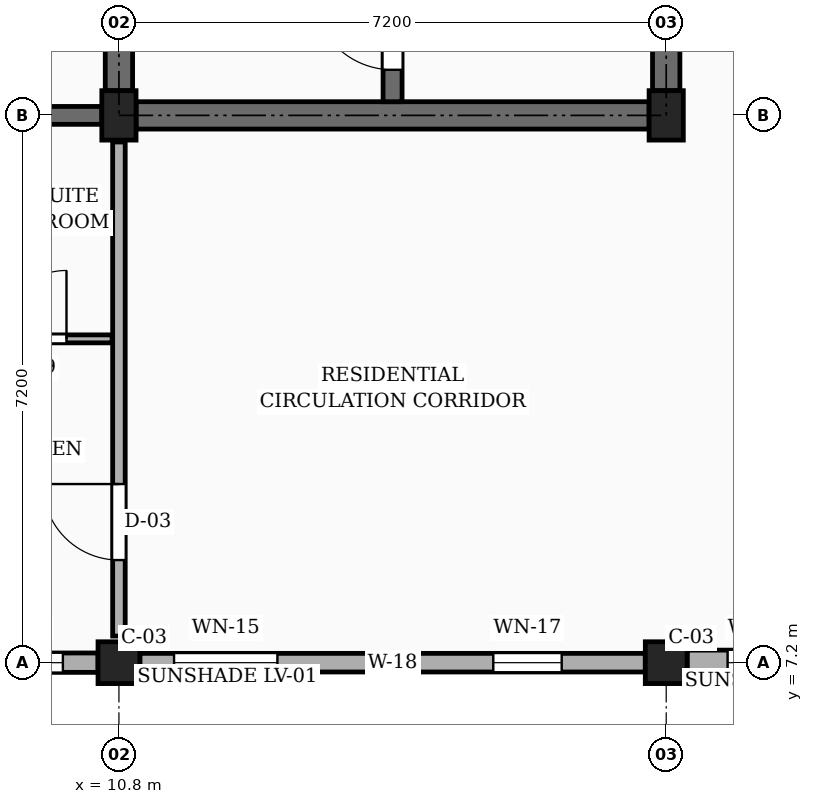
"""IFC4 building model, lengths in metres.
Left out: names, types, materials, properties, quantities, classifications, styles, units other than length and angle.
Written with IfcOpenShell. Run it as: python <this file> out.ifc"""

import sys

from ifc_helpers import new_model, si_unit, direction, frame, frame_2d, origin, origin_2d, place, context, subcontext, project, spatial, rectangle, extrude, element, fill, save


model = new_model("IFC4")
c1 = context("Model", 3, precision=1e-05, world=origin(), true_north=direction((0.0, 1.0)))
c2 = subcontext(c1, "Body", "Model", "MODEL_VIEW")
j1 = project(units=[si_unit("LENGTHUNIT", "METRE"), si_unit("PLANEANGLEUNIT", "RADIAN")], contexts=[c1])
p1 = place(None, origin())
s1 = spatial("IfcSite", under=j1, at=p1, CompositionType="ELEMENT")
p2 = place(p1, origin())
s2 = spatial("IfcBuilding", under=s1, at=p2, CompositionType="ELEMENT")
p3 = place(p2, frame((0.0, 0.0, 17.1)))
s3 = spatial("IfcBuildingStorey", under=s2, at=p3, CompositionType="ELEMENT", Elevation=17.1)
p4 = place(p3, frame((10.8, 7.2, 0.0), z_axis=(0.0, 0.0, 1.0), x_axis=(1.0, 0.0, 0.0)))
e1 = element("IfcColumn", 1, at=p4, inside=s3, PredefinedType="COLUMN", context=c2, shape_type="SweptSolid", body=[
    extrude(rectangle(XDim=0.55, YDim=0.55, at=origin_2d()), origin(), (0.0, 0.0, 1.0), 3.15),
])
p5 = place(p3, frame((10.8, 14.4, 0.0), z_axis=(0.0, 0.0, 1.0), x_axis=(1.0, 0.0, 0.0)))
e2 = element("IfcColumn", 2, at=p5, inside=s3, PredefinedType="COLUMN", context=c2, shape_type="SweptSolid", body=[
    extrude(rectangle(XDim=0.45, YDim=0.65, at=origin_2d()), origin(), (0.0, 0.0, 1.0), 3.15),
])
p6 = place(p3, frame((18.0, 7.2, 0.0), z_axis=(0.0, 0.0, 1.0), x_axis=(1.0, 0.0, 0.0)))
e3 = element("IfcColumn", 3, at=p6, inside=s3, PredefinedType="COLUMN", context=c2, shape_type="SweptSolid", body=[
    extrude(rectangle(XDim=0.55, YDim=0.55, at=origin_2d()), origin(), (0.0, 0.0, 1.0), 3.15),
])
p7 = place(p3, frame((18.0, 14.4, 0.0), z_axis=(0.0, 0.0, 1.0), x_axis=(1.0, 0.0, 0.0)))
e4 = element("IfcColumn", 4, at=p7, inside=s3, PredefinedType="COLUMN", context=c2, shape_type="SweptSolid", body=[
    extrude(rectangle(XDim=0.45, YDim=0.65, at=origin_2d()), origin(), (0.0, 0.0, 1.0), 3.15),
])
p8 = place(p3, frame((3.875, 14.4, 0.0), z_axis=(0.0, 0.0, 1.0), x_axis=(1.0, 0.0, 0.0)))
e5 = element("IfcWall", 5, at=p8, inside=s3, PredefinedType="SOLIDWALL", context=c2, shape_type="SweptSolid", body=[
    extrude(rectangle(XDim=6.7, YDim=0.235, at=frame_2d((3.35, 0.0))), origin(), (0.0, 0.0, 1.0), 2.17),
])
p9 = place(p8, frame((1.35, 0.0, 0.0)))
e6 = element("IfcOpeningElement", 6, at=p9, cuts=e5, PredefinedType="OPENING", context=c2, shape_type="SweptSolid", body=[
    extrude(rectangle(XDim=0.98, YDim=2.12, at=frame_2d((0.49, 1.06))), frame((0.0, 0.127, 0.0), z_axis=(0.0, -1.0, 0.0), x_axis=(1.0, 0.0, 0.0)), (0.0, 0.0, 1.0), 0.255),
])
p10 = place(p3, frame((3.875, 7.2, 0.0), z_axis=(0.0, 0.0, 1.0), x_axis=(1.0, 0.0, 0.0)))
e7 = element("IfcWall", 7, at=p10, inside=s3, PredefinedType="SOLIDWALL", context=c2, shape_type="SweptSolid", body=[
    extrude(rectangle(XDim=6.65, YDim=0.255, at=frame_2d((3.325, 0.0))), origin(), (0.0, 0.0, 1.0), 2.44),
])
p11 = place(p10, frame((1.802, 0.0, 0.78)))
e8 = element("IfcOpeningElement", 8, at=p11, cuts=e7, PredefinedType="OPENING", context=c2, shape_type="SweptSolid", body=[
    extrude(rectangle(XDim=1.2, YDim=1.26, at=frame_2d((0.6, 0.63))), frame((0.0, 0.137, 0.0), z_axis=(0.0, -1.0, 0.0), x_axis=(1.0, 0.0, 0.0)), (0.0, 0.0, 1.0), 0.275),
])
p12 = place(p10, frame((4.988, 0.0, 0.78)))
e9 = element("IfcOpeningElement", 9, at=p12, cuts=e7, PredefinedType="OPENING", context=c2, shape_type="SweptSolid", body=[
    extrude(rectangle(XDim=1.2, YDim=1.26, at=frame_2d((0.6, 0.63))), frame((0.0, 0.137, 0.0), z_axis=(0.0, -1.0, 0.0), x_axis=(1.0, 0.0, 0.0)), (0.0, 0.0, 1.0), 0.275),
])
p13 = place(p3, frame((11.075, 7.2, 0.0), z_axis=(0.0, 0.0, 1.0), x_axis=(1.0, 0.0, 0.0)))
e10 = element("IfcWall", 10, at=p13, inside=s3, PredefinedType="SOLIDWALL", context=c2, shape_type="SweptSolid", body=[
    extrude(rectangle(XDim=6.65, YDim=0.245, at=frame_2d((3.325, 0.0))), origin(), (0.0, 0.0, 1.0), 2.44),
])
p14 = place(p13, frame((0.45, 0.0, 0.78)))
e11 = element("IfcOpeningElement", 11, at=p14, cuts=e10, PredefinedType="OPENING", context=c2, shape_type="SweptSolid", body=[
    extrude(rectangle(XDim=1.36, YDim=1.26, at=frame_2d((0.68, 0.63))), frame((0.0, 0.133, 0.0), z_axis=(0.0, -1.0, 0.0), x_axis=(1.0, 0.0, 0.0)), (0.0, 0.0, 1.0), 0.265),
])
p15 = place(p13, frame((4.65, 0.0, 0.78)))
e12 = element("IfcOpeningElement", 12, at=p15, cuts=e10, PredefinedType="OPENING", context=c2, shape_type="SweptSolid", body=[
    extrude(rectangle(XDim=0.9, YDim=1.36, at=frame_2d((0.45, 0.68))), frame((0.0, 0.133, 0.0), z_axis=(0.0, -1.0, 0.0), x_axis=(1.0, 0.0, 0.0)), (0.0, 0.0, 1.0), 0.265),
])
p16 = place(p3, frame((18.275, 7.2, 0.0), z_axis=(0.0, 0.0, 1.0), x_axis=(1.0, 0.0, 0.0)))
e13 = element("IfcWall", 13, at=p16, inside=s3, PredefinedType="SOLIDWALL", context=c2, shape_type="SweptSolid", body=[
    extrude(rectangle(XDim=6.65, YDim=0.33, at=frame_2d((3.325, 0.0))), origin(), (0.0, 0.0, 1.0), 2.44),
])
p17 = place(p16, frame((0.532, 0.0, 0.78)))
e14 = element("IfcOpeningElement", 14, at=p17, cuts=e13, PredefinedType="OPENING", context=c2, shape_type="SweptSolid", body=[
    extrude(rectangle(XDim=0.9, YDim=1.36, at=frame_2d((0.45, 0.68))), frame((0.0, 0.175, 0.0), z_axis=(0.0, -1.0, 0.0), x_axis=(1.0, 0.0, 0.0)), (0.0, 0.0, 1.0), 0.35),
])
p18 = place(p16, frame((2.995, 0.0, 0.78)))
e15 = element("IfcOpeningElement", 15, at=p18, cuts=e13, PredefinedType="OPENING", context=c2, shape_type="SweptSolid", body=[
    extrude(rectangle(XDim=1.06, YDim=1.36, at=frame_2d((0.53, 0.68))), frame((0.0, 0.175, 0.0), z_axis=(0.0, -1.0, 0.0), x_axis=(1.0, 0.0, 0.0)), (0.0, 0.0, 1.0), 0.35),
])
p19 = place(p3, frame((10.8, 14.725, 0.0), z_axis=(0.0, 0.0, 1.0), x_axis=(0.0, 1.0, 0.0)))
e16 = element("IfcWall", 16, at=p19, inside=s3, PredefinedType="SHEAR", context=c2, shape_type="SweptSolid", body=[
    extrude(rectangle(XDim=6.55, YDim=0.36, at=frame_2d((3.275, 0.0))), origin(), (0.0, 0.0, 1.0), 2.87),
])
p20 = place(p3, frame((18.0, 14.725, 0.0), z_axis=(0.0, 0.0, 1.0), x_axis=(0.0, 1.0, 0.0)))
e17 = element("IfcWall", 17, at=p20, inside=s3, PredefinedType="SHEAR", context=c2, shape_type="SweptSolid", body=[
    extrude(rectangle(XDim=6.55, YDim=0.36, at=frame_2d((3.275, 0.0))), origin(), (0.0, 0.0, 1.0), 2.87),
])
p21 = place(p20, frame((1.5, 0.0, 0.0)))
e18 = element("IfcOpeningElement", 18, at=p21, cuts=e17, PredefinedType="OPENING", context=c2, shape_type="SweptSolid", body=[
    extrude(rectangle(XDim=1.1, YDim=2.15, at=frame_2d((0.55, 1.075))), frame((0.0, 0.19, 0.0), z_axis=(0.0, -1.0, 0.0), x_axis=(1.0, 0.0, 0.0)), (0.0, 0.0, 1.0), 0.38),
])
p22 = place(p3, frame((11.025, 14.4, 0.0), z_axis=(0.0, 0.0, 1.0), x_axis=(1.0, 0.0, 0.0)))
e19 = element("IfcWall", 19, at=p22, inside=s3, PredefinedType="SHEAR", context=c2, shape_type="SweptSolid", body=[
    extrude(rectangle(XDim=6.75, YDim=0.36, at=frame_2d((3.375, 0.0))), origin(), (0.0, 0.0, 1.0), 2.87),
])
p23 = place(p3, frame((14.4, 14.58, 0.0), z_axis=(0.0, 0.0, 1.0), x_axis=(0.0, 1.0, 0.0)))
e20 = element("IfcWall", 20, at=p23, inside=s3, PredefinedType="SHEAR", context=c2, shape_type="SweptSolid", body=[
    extrude(rectangle(XDim=6.84, YDim=0.25, at=frame_2d((3.42, 0.0))), origin(), (0.0, 0.0, 1.0), 2.87),
])
p24 = place(p23, frame((0.42, 0.0, 0.0)))
e21 = element("IfcOpeningElement", 21, at=p24, cuts=e20, PredefinedType="OPENING", context=c2, shape_type="SweptSolid", body=[
    extrude(rectangle(XDim=1.05, YDim=2.15, at=frame_2d((0.525, 1.075))), frame((0.0, 0.135, 0.0), z_axis=(0.0, -1.0, 0.0), x_axis=(1.0, 0.0, 0.0)), (0.0, 0.0, 1.0), 0.27),
])
p25 = place(p3, frame((10.8, 7.55, 0.0), z_axis=(0.0, 0.0, 1.0), x_axis=(0.0, 1.0, 0.0)))
e22 = element("IfcWall", 22, at=p25, inside=s3, PredefinedType="PARTITIONING", context=c2, shape_type="SweptSolid", body=[
    extrude(rectangle(XDim=6.5, YDim=0.165, at=frame_2d((3.25, 0.0))), origin(), (0.0, 0.0, 1.0), 2.305),
])
p26 = place(p25, frame((1.0, 0.0, 0.0)))
e23 = element("IfcOpeningElement", 23, at=p26, cuts=e22, PredefinedType="OPENING", context=c2, shape_type="SweptSolid", body=[
    extrude(rectangle(XDim=1.0, YDim=2.15, at=frame_2d((0.5, 1.075))), frame((0.0, 0.093, 0.0), z_axis=(0.0, -1.0, 0.0), x_axis=(1.0, 0.0, 0.0)), (0.0, 0.0, 1.0), 0.185),
])
p27 = place(p3, frame((8.61, 11.46, 0.0), z_axis=(0.0, 0.0, 1.0), x_axis=(1.0, 0.0, 0.0)))
e24 = element("IfcWall", 24, at=p27, inside=s3, PredefinedType="PARTITIONING", context=c2, shape_type="SweptSolid", body=[
    extrude(rectangle(XDim=2.1, YDim=0.105, at=frame_2d((1.05, 0.0))), origin(), (0.0, 0.0, 1.0), 2.305),
])
p28 = place(p27, frame((0.6, 0.0, 0.0)))
e25 = element("IfcOpeningElement", 25, at=p28, cuts=e24, PredefinedType="OPENING", context=c2, shape_type="SweptSolid", body=[
    extrude(rectangle(XDim=0.9, YDim=2.05, at=frame_2d((0.45, 1.025))), frame((0.0, 0.062, 0.0), z_axis=(0.0, -1.0, 0.0), x_axis=(1.0, 0.0, 0.0)), (0.0, 0.0, 1.0), 0.125),
])
p29 = place(p12, origin())
e26 = element("IfcWindow", 26, at=p29, inside=s3, PartitioningType="SINGLE_PANEL", PredefinedType="WINDOW", context=c2, shape_type="SweptSolid", body=[
    extrude(rectangle(XDim=1.2, YDim=1.26, at=frame_2d((0.6, 0.63))), frame((0.0, 0.03, 0.0), z_axis=(0.0, -1.0, 0.0), x_axis=(1.0, 0.0, 0.0)), (0.0, 0.0, 1.0), 0.06),
])
fill(e9, e26)
p30 = place(p14, origin())
e27 = element("IfcWindow", 27, at=p30, inside=s3, PartitioningType="SINGLE_PANEL", PredefinedType="WINDOW", context=c2, shape_type="SweptSolid", body=[
    extrude(rectangle(XDim=1.36, YDim=1.26, at=frame_2d((0.68, 0.63))), frame((0.0, 0.03, 0.0), z_axis=(0.0, -1.0, 0.0), x_axis=(1.0, 0.0, 0.0)), (0.0, 0.0, 1.0), 0.06),
])
fill(e11, e27)
p31 = place(p15, origin())
e28 = element("IfcWindow", 28, at=p31, inside=s3, PartitioningType="SINGLE_PANEL", PredefinedType="WINDOW", context=c2, shape_type="SweptSolid", body=[
    extrude(rectangle(XDim=0.9, YDim=1.36, at=frame_2d((0.45, 0.68))), frame((0.0, 0.03, 0.0), z_axis=(0.0, -1.0, 0.0), x_axis=(1.0, 0.0, 0.0)), (0.0, 0.0, 1.0), 0.06),
])
fill(e12, e28)
p32 = place(p17, origin())
e29 = element("IfcWindow", 29, at=p32, inside=s3, PartitioningType="SINGLE_PANEL", PredefinedType="WINDOW", context=c2, shape_type="SweptSolid", body=[
    extrude(rectangle(XDim=0.9, YDim=1.36, at=frame_2d((0.45, 0.68))), frame((0.0, 0.03, 0.0), z_axis=(0.0, -1.0, 0.0), x_axis=(1.0, 0.0, 0.0)), (0.0, 0.0, 1.0), 0.06),
])
fill(e14, e29)
p33 = place(p24, origin())
e30 = element("IfcDoor", 30, at=p33, inside=s3, OperationType="SINGLE_SWING_RIGHT", PredefinedType="DOOR", context=c2, shape_type="SweptSolid", body=[
    extrude(rectangle(XDim=1.05, YDim=2.15, at=frame_2d((0.525, 1.075))), frame((0.0, 0.025, 0.0), z_axis=(0.0, -1.0, 0.0), x_axis=(1.0, 0.0, 0.0)), (0.0, 0.0, 1.0), 0.05),
])
fill(e21, e30)
p34 = place(p26, origin())
e31 = element("IfcDoor", 31, at=p34, inside=s3, OperationType="SINGLE_SWING_RIGHT", PredefinedType="DOOR", context=c2, shape_type="SweptSolid", body=[
    extrude(rectangle(XDim=1.0, YDim=2.15, at=frame_2d((0.5, 1.075))), frame((0.0, 0.025, 0.0), z_axis=(0.0, -1.0, 0.0), x_axis=(1.0, 0.0, 0.0)), (0.0, 0.0, 1.0), 0.05),
])
fill(e23, e31)
p35 = place(p28, origin())
e32 = element("IfcDoor", 32, at=p35, inside=s3, OperationType="SINGLE_SWING_RIGHT", PredefinedType="DOOR", context=c2, shape_type="SweptSolid", body=[
    extrude(rectangle(XDim=0.9, YDim=2.05, at=frame_2d((0.45, 1.025))), frame((0.0, 0.025, 0.0), z_axis=(0.0, -1.0, 0.0), x_axis=(1.0, 0.0, 0.0)), (0.0, 0.0, 1.0), 0.05),
])
fill(e25, e32)
save(model, sys.argv[1])
